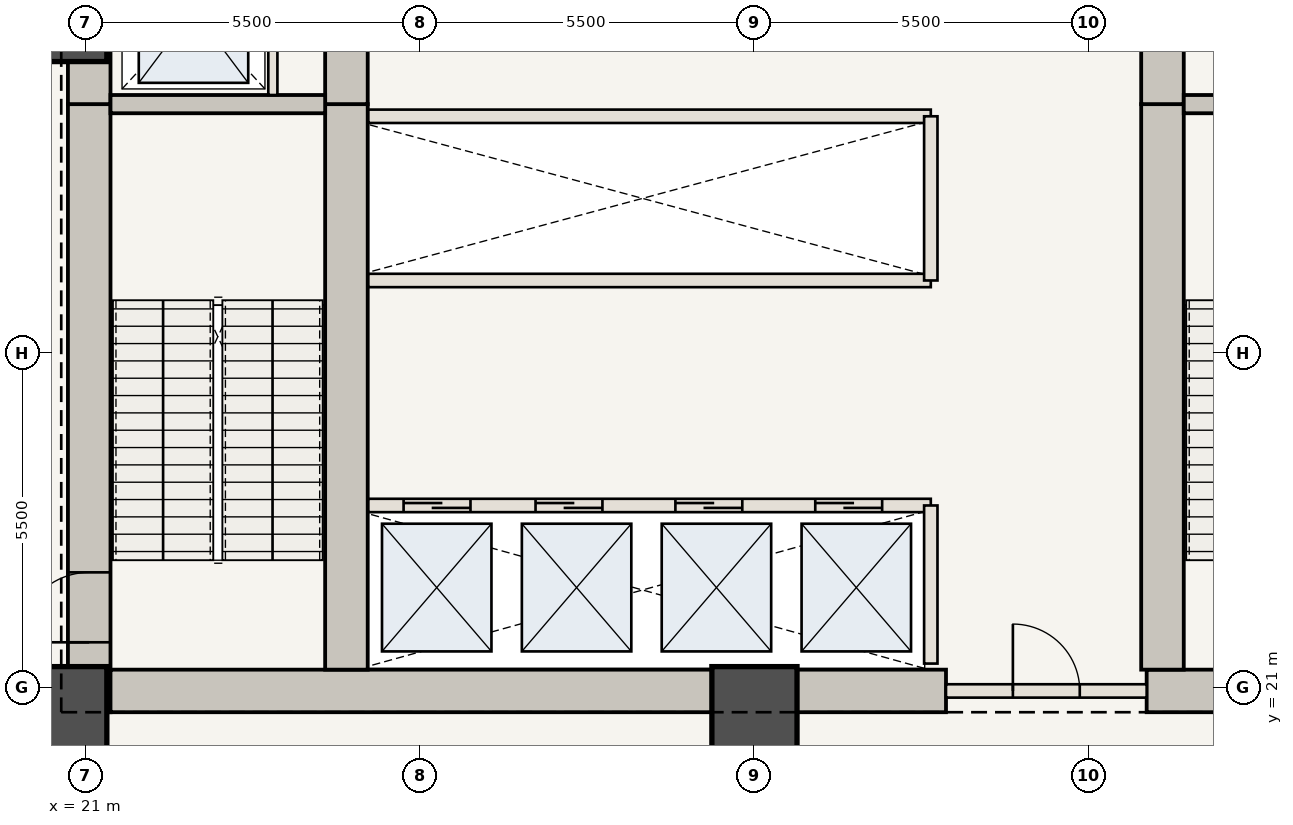
"""IFC4 building model, lengths in metres.
Left out: names, types, materials, properties, quantities, classifications, styles, units other than length and angle.
Written with IfcOpenShell. Run it as: python <this file> out.ifc"""

import sys

from ifc_helpers import new_model, si_unit, direction, frame, frame_2d, origin, origin_2d, place, context, subcontext, project, spatial, rectangle, extrude, element, fill, save


model = new_model("IFC4")
c1 = context("Model", 3, precision=1e-05, world=origin(), true_north=direction((0.0, 1.0)))
c2 = subcontext(c1, "Body", "Model", "MODEL_VIEW")
j1 = project(units=[si_unit("LENGTHUNIT", "METRE"), si_unit("PLANEANGLEUNIT", "RADIAN")], contexts=[c1])
p1 = place(None, origin())
s1 = spatial("IfcSite", under=j1, at=p1, CompositionType="ELEMENT")
p2 = place(p1, origin())
s2 = spatial("IfcBuilding", under=s1, at=p2, CompositionType="ELEMENT")
p3 = place(p2, frame((0.0, 0.0, 12.25)))
s3 = spatial("IfcBuildingStorey", under=s2, at=p3, CompositionType="ELEMENT", Elevation=12.25)
p4 = place(p3, frame((21.06, 20.6, 0.0), z_axis=(0.0, 0.0, 1.0), x_axis=(0.0, 1.0, 0.0)))
e1 = element("IfcWall", 1, at=p4, inside=s3, PredefinedType="SHEAR", context=c2, shape_type="SweptSolid", body=[
    extrude(rectangle(XDim=10.0, YDim=0.7, at=frame_2d((5.0, 0.0))), origin(), (0.0, 0.0, 1.0), 5.6),
])
p5 = place(p4, frame((1.15, 0.0, 0.0)))
e2 = element("IfcOpeningElement", 2, at=p5, cuts=e1, PredefinedType="OPENING", context=c2, shape_type="SweptSolid", body=[
    extrude(rectangle(XDim=1.15, YDim=2.15, at=frame_2d((0.575, 1.075))), frame((0.0, 0.36, 0.0), z_axis=(0.0, -1.0, 0.0), x_axis=(1.0, 0.0, 0.0)), (0.0, 0.0, 1.0), 0.72),
])
p6 = place(p3, frame((21.06, 30.6, 0.0), z_axis=(0.0, 0.0, 1.0), x_axis=(0.0, 1.0, 0.0)))
e3 = element("IfcWall", 3, at=p6, inside=s3, PredefinedType="SHEAR", context=c2, shape_type="SweptSolid", body=[
    extrude(rectangle(XDim=12.75, YDim=0.7, at=frame_2d((6.375, 0.0))), origin(), (0.0, 0.0, 1.0), 5.6),
])
p7 = place(p6, frame((4.2, 0.0, 0.0)))
e4 = element("IfcOpeningElement", 4, at=p7, cuts=e3, PredefinedType="OPENING", context=c2, shape_type="SweptSolid", body=[
    extrude(rectangle(XDim=1.1, YDim=2.15, at=frame_2d((0.55, 1.075))), frame((0.0, 0.36, 0.0), z_axis=(0.0, -1.0, 0.0), x_axis=(1.0, 0.0, 0.0)), (0.0, 0.0, 1.0), 0.72),
])
p8 = place(p6, frame((8.05, 0.0, 0.0)))
e5 = element("IfcOpeningElement", 5, at=p8, cuts=e3, PredefinedType="OPENING", context=c2, shape_type="SweptSolid", body=[
    extrude(rectangle(XDim=0.92, YDim=2.1, at=frame_2d((0.46, 1.05))), frame((0.0, 0.36, 0.0), z_axis=(0.0, -1.0, 0.0), x_axis=(1.0, 0.0, 0.0)), (0.0, 0.0, 1.0), 0.72),
])
p9 = place(p6, frame((9.45, 0.0, 0.0)))
e6 = element("IfcOpeningElement", 6, at=p9, cuts=e3, PredefinedType="OPENING", context=c2, shape_type="SweptSolid", body=[
    extrude(rectangle(XDim=0.88, YDim=2.1, at=frame_2d((0.44, 1.05))), frame((0.0, 0.36, 0.0), z_axis=(0.0, -1.0, 0.0), x_axis=(1.0, 0.0, 0.0)), (0.0, 0.0, 1.0), 0.72),
])
p10 = place(p6, frame((10.85, 0.0, 0.0)))
e7 = element("IfcOpeningElement", 7, at=p10, cuts=e3, PredefinedType="OPENING", context=c2, shape_type="SweptSolid", body=[
    extrude(rectangle(XDim=0.88, YDim=2.1, at=frame_2d((0.44, 1.05))), frame((0.0, 0.36, 0.0), z_axis=(0.0, -1.0, 0.0), x_axis=(1.0, 0.0, 0.0)), (0.0, 0.0, 1.0), 0.72),
])
p11 = place(p3, frame((21.41, 20.95, 0.0), z_axis=(0.0, 0.0, 1.0), x_axis=(1.0, 0.0, 0.0)))
e8 = element("IfcWall", 8, at=p11, inside=s3, PredefinedType="SHEAR", context=c2, shape_type="SweptSolid", body=[
    extrude(rectangle(XDim=13.74, YDim=0.7, at=frame_2d((6.87, 0.0))), origin(), (0.0, 0.0, 1.0), 5.6),
])
p12 = place(p3, frame((38.45, 20.95, 0.0), z_axis=(0.0, 0.0, 1.0), x_axis=(1.0, 0.0, 0.0)))
e9 = element("IfcWall", 9, at=p12, inside=s3, PredefinedType="SHEAR", context=c2, shape_type="SweptSolid", body=[
    extrude(rectangle(XDim=4.14, YDim=0.7, at=frame_2d((2.07, 0.0))), origin(), (0.0, 0.0, 1.0), 5.6),
])
p13 = place(p3, frame((25.29, 21.3, 0.0), z_axis=(0.0, 0.0, 1.0), x_axis=(0.0, 1.0, 0.0)))
e10 = element("IfcWall", 10, at=p13, inside=s3, PredefinedType="SHEAR", context=c2, shape_type="SweptSolid", body=[
    extrude(rectangle(XDim=9.3, YDim=0.7, at=frame_2d((4.65, 0.0))), origin(), (0.0, 0.0, 1.0), 5.6),
])
p14 = place(p3, frame((25.29, 30.6, 0.0), z_axis=(0.0, 0.0, 1.0), x_axis=(0.0, 1.0, 0.0)))
e11 = element("IfcWall", 11, at=p14, inside=s3, PredefinedType="SHEAR", context=c2, shape_type="SweptSolid", body=[
    extrude(rectangle(XDim=12.05, YDim=0.7, at=frame_2d((6.025, 0.0))), origin(), (0.0, 0.0, 1.0), 5.6),
])
p15 = place(p14, frame((6.25, 0.0, 0.0)))
e12 = element("IfcOpeningElement", 12, at=p15, cuts=e11, PredefinedType="OPENING", context=c2, shape_type="SweptSolid", body=[
    extrude(rectangle(XDim=1.1, YDim=2.15, at=frame_2d((0.55, 1.075))), frame((0.0, 0.36, 0.0), z_axis=(0.0, -1.0, 0.0), x_axis=(1.0, 0.0, 0.0)), (0.0, 0.0, 1.0), 0.72),
])
p16 = place(p3, frame((38.71, 21.3, 0.0), z_axis=(0.0, 0.0, 1.0), x_axis=(0.0, 1.0, 0.0)))
e13 = element("IfcWall", 13, at=p16, inside=s3, PredefinedType="SHEAR", context=c2, shape_type="SweptSolid", body=[
    extrude(rectangle(XDim=9.3, YDim=0.7, at=frame_2d((4.65, 0.0))), origin(), (0.0, 0.0, 1.0), 5.6),
])
p17 = place(p3, frame((38.71, 30.6, 0.0), z_axis=(0.0, 0.0, 1.0), x_axis=(0.0, 1.0, 0.0)))
e14 = element("IfcWall", 14, at=p17, inside=s3, PredefinedType="SHEAR", context=c2, shape_type="SweptSolid", body=[
    extrude(rectangle(XDim=12.05, YDim=0.7, at=frame_2d((6.025, 0.0))), origin(), (0.0, 0.0, 1.0), 5.6),
])
for number, where, z_axis, x_axis in (
    (15, (20.65, 20.65, 0.0), (0.0, 0.0, 1.0), (1.0, 0.0, 0.0)),
    (16, (32.0, 20.65, 0.0), (0.0, 0.0, 1.0), (1.0, 0.0, 0.0)),
    (17, (20.65, 32.0, 0.0), (0.0, 0.0, 1.0), (1.0, 0.0, 0.0)),
):
    element("IfcColumn", number, at=place(p3, frame(where, z_axis=z_axis, x_axis=x_axis)), inside=s3, PredefinedType="COLUMN", context=c2, shape_type="SweptSolid", body=[
        extrude(rectangle(XDim=1.4, YDim=1.4, at=origin_2d()), origin(), (0.0, 0.0, 1.0), 5.6),
    ])
for number, where, z_axis, x_axis in (
    (18, (21.41, 30.6, 0.0), (0.0, 0.0, 1.0), (1.0, 0.0, 0.0)),
    (19, (39.06, 30.6, 0.0), (0.0, 0.0, 1.0), (1.0, 0.0, 0.0)),
):
    element("IfcWall", number, at=place(p3, frame(where, z_axis=z_axis, x_axis=x_axis)), inside=s3, PredefinedType="SHEAR", context=c2, shape_type="SweptSolid", body=[
        extrude(rectangle(XDim=3.53, YDim=0.3, at=frame_2d((1.765, 0.0))), origin(), (0.0, 0.0, 1.0), 5.36),
    ])
p18 = place(p3, frame((24.08, 30.75, 0.0), z_axis=(0.0, 0.0, 1.0), x_axis=(0.0, 1.0, 0.0)))
e20 = element("IfcWall", 20, at=p18, inside=s3, PredefinedType="STANDARD", context=c2, shape_type="SweptSolid", body=[
    extrude(rectangle(XDim=2.65, YDim=0.15, at=frame_2d((1.325, 0.0))), origin(), (0.0, 0.0, 1.0), 5.36),
])
p19 = place(p3, frame((35.15, 20.95, 0.0), z_axis=(0.0, 0.0, 1.0), x_axis=(1.0, 0.0, 0.0)))
e21 = element("IfcWall", 21, at=p19, inside=s3, PredefinedType="STANDARD", context=c2, shape_type="SweptSolid", body=[
    extrude(rectangle(XDim=3.3, YDim=0.22, at=frame_2d((1.65, 0.0))), origin(), (0.0, 0.0, 1.0), 5.36),
])
p20 = place(p19, frame((1.1, 0.0, 0.0)))
e22 = element("IfcOpeningElement", 22, at=p20, cuts=e21, PredefinedType="OPENING", context=c2, shape_type="SweptSolid", body=[
    extrude(rectangle(XDim=1.1, YDim=2.15, at=frame_2d((0.55, 1.075))), frame((0.0, 0.12, 0.0), z_axis=(0.0, -1.0, 0.0), x_axis=(1.0, 0.0, 0.0)), (0.0, 0.0, 1.0), 0.24),
])
p21 = place(p3, frame((25.65, 24.0, 0.0), z_axis=(0.0, 0.0, 1.0), x_axis=(1.0, 0.0, 0.0)))
e23 = element("IfcWall", 23, at=p21, inside=s3, PredefinedType="STANDARD", context=c2, shape_type="SweptSolid", body=[
    extrude(rectangle(XDim=9.25, YDim=0.22, at=frame_2d((4.625, 0.0))), origin(), (0.0, 0.0, 1.0), 5.36),
])
p22 = place(p21, frame((0.58, 0.0, 0.0)))
e24 = element("IfcOpeningElement", 24, at=p22, cuts=e23, PredefinedType="OPENING", context=c2, shape_type="SweptSolid", body=[
    extrude(rectangle(XDim=1.1, YDim=2.15, at=frame_2d((0.55, 1.075))), frame((0.0, 0.12, 0.0), z_axis=(0.0, -1.0, 0.0), x_axis=(1.0, 0.0, 0.0)), (0.0, 0.0, 1.0), 0.24),
])
p23 = place(p21, frame((2.75, 0.0, 0.0)))
e25 = element("IfcOpeningElement", 25, at=p23, cuts=e23, PredefinedType="OPENING", context=c2, shape_type="SweptSolid", body=[
    extrude(rectangle(XDim=1.1, YDim=2.15, at=frame_2d((0.55, 1.075))), frame((0.0, 0.12, 0.0), z_axis=(0.0, -1.0, 0.0), x_axis=(1.0, 0.0, 0.0)), (0.0, 0.0, 1.0), 0.24),
])
p24 = place(p21, frame((5.05, 0.0, 0.0)))
e26 = element("IfcOpeningElement", 26, at=p24, cuts=e23, PredefinedType="OPENING", context=c2, shape_type="SweptSolid", body=[
    extrude(rectangle(XDim=1.1, YDim=2.15, at=frame_2d((0.55, 1.075))), frame((0.0, 0.12, 0.0), z_axis=(0.0, -1.0, 0.0), x_axis=(1.0, 0.0, 0.0)), (0.0, 0.0, 1.0), 0.24),
])
p25 = place(p21, frame((7.35, 0.0, 0.0)))
e27 = element("IfcOpeningElement", 27, at=p25, cuts=e23, PredefinedType="OPENING", context=c2, shape_type="SweptSolid", body=[
    extrude(rectangle(XDim=1.1, YDim=2.15, at=frame_2d((0.55, 1.075))), frame((0.0, 0.12, 0.0), z_axis=(0.0, -1.0, 0.0), x_axis=(1.0, 0.0, 0.0)), (0.0, 0.0, 1.0), 0.24),
])
p26 = place(p3, frame((34.9, 21.4, 0.0), z_axis=(0.0, 0.0, 1.0), x_axis=(0.0, 1.0, 0.0)))
e28 = element("IfcWall", 28, at=p26, inside=s3, PredefinedType="STANDARD", context=c2, shape_type="SweptSolid", body=[
    extrude(rectangle(XDim=2.6, YDim=0.22, at=frame_2d((1.3, 0.0))), origin(), (0.0, 0.0, 1.0), 5.36),
])
for number, where, z_axis, x_axis in (
    (29, (25.65, 27.7, 0.0), (0.0, 0.0, 1.0), (1.0, 0.0, 0.0)),
    (30, (25.65, 30.4, 0.0), (0.0, 0.0, 1.0), (1.0, 0.0, 0.0)),
):
    element("IfcWall", number, at=place(p3, frame(where, z_axis=z_axis, x_axis=x_axis)), inside=s3, PredefinedType="STANDARD", context=c2, shape_type="SweptSolid", body=[
        extrude(rectangle(XDim=9.25, YDim=0.22, at=frame_2d((4.625, 0.0))), origin(), (0.0, 0.0, 1.0), 5.36),
    ])
p27 = place(p3, frame((34.9, 27.7, 0.0), z_axis=(0.0, 0.0, 1.0), x_axis=(0.0, 1.0, 0.0)))
e31 = element("IfcWall", 31, at=p27, inside=s3, PredefinedType="STANDARD", context=c2, shape_type="SweptSolid", body=[
    extrude(rectangle(XDim=2.7, YDim=0.22, at=frame_2d((1.35, 0.0))), origin(), (0.0, 0.0, 1.0), 5.36),
])
p28 = place(p5, origin())
e32 = element("IfcDoor", 32, at=p28, inside=s3, OperationType="SINGLE_SWING_LEFT", PredefinedType="DOOR", context=c2, shape_type="SweptSolid", body=[
    extrude(rectangle(XDim=1.15, YDim=2.15, at=frame_2d((0.575, 1.075))), frame((0.0, 0.025, 0.0), z_axis=(0.0, -1.0, 0.0), x_axis=(1.0, 0.0, 0.0)), (0.0, 0.0, 1.0), 0.05),
])
fill(e2, e32)
p29 = place(p20, origin())
e33 = element("IfcDoor", 33, at=p29, inside=s3, OperationType="SINGLE_SWING_LEFT", PredefinedType="DOOR", context=c2, shape_type="SweptSolid", body=[
    extrude(rectangle(XDim=1.1, YDim=2.15, at=frame_2d((0.55, 1.075))), frame((0.0, 0.025, 0.0), z_axis=(0.0, -1.0, 0.0), x_axis=(1.0, 0.0, 0.0)), (0.0, 0.0, 1.0), 0.05),
])
fill(e22, e33)
p30 = place(p22, origin())
e34 = element("IfcDoor", 34, at=p30, inside=s3, OperationType="DOUBLE_DOOR_SLIDING", PredefinedType="DOOR", context=c2, shape_type="SweptSolid", body=[
    extrude(rectangle(XDim=1.1, YDim=2.15, at=frame_2d((0.55, 1.075))), frame((0.0, 0.025, 0.0), z_axis=(0.0, -1.0, 0.0), x_axis=(1.0, 0.0, 0.0)), (0.0, 0.0, 1.0), 0.05),
])
fill(e24, e34)
p31 = place(p23, origin())
e35 = element("IfcDoor", 35, at=p31, inside=s3, OperationType="DOUBLE_DOOR_SLIDING", PredefinedType="DOOR", context=c2, shape_type="SweptSolid", body=[
    extrude(rectangle(XDim=1.1, YDim=2.15, at=frame_2d((0.55, 1.075))), frame((0.0, 0.025, 0.0), z_axis=(0.0, -1.0, 0.0), x_axis=(1.0, 0.0, 0.0)), (0.0, 0.0, 1.0), 0.05),
])
fill(e25, e35)
p32 = place(p24, origin())
e36 = element("IfcDoor", 36, at=p32, inside=s3, OperationType="DOUBLE_DOOR_SLIDING", PredefinedType="DOOR", context=c2, shape_type="SweptSolid", body=[
    extrude(rectangle(XDim=1.1, YDim=2.15, at=frame_2d((0.55, 1.075))), frame((0.0, 0.025, 0.0), z_axis=(0.0, -1.0, 0.0), x_axis=(1.0, 0.0, 0.0)), (0.0, 0.0, 1.0), 0.05),
])
fill(e26, e36)
p33 = place(p25, origin())
e37 = element("IfcDoor", 37, at=p33, inside=s3, OperationType="DOUBLE_DOOR_SLIDING", PredefinedType="DOOR", context=c2, shape_type="SweptSolid", body=[
    extrude(rectangle(XDim=1.1, YDim=2.15, at=frame_2d((0.55, 1.075))), frame((0.0, 0.025, 0.0), z_axis=(0.0, -1.0, 0.0), x_axis=(1.0, 0.0, 0.0)), (0.0, 0.0, 1.0), 0.05),
])
fill(e27, e37)
save(model, sys.argv[1])
